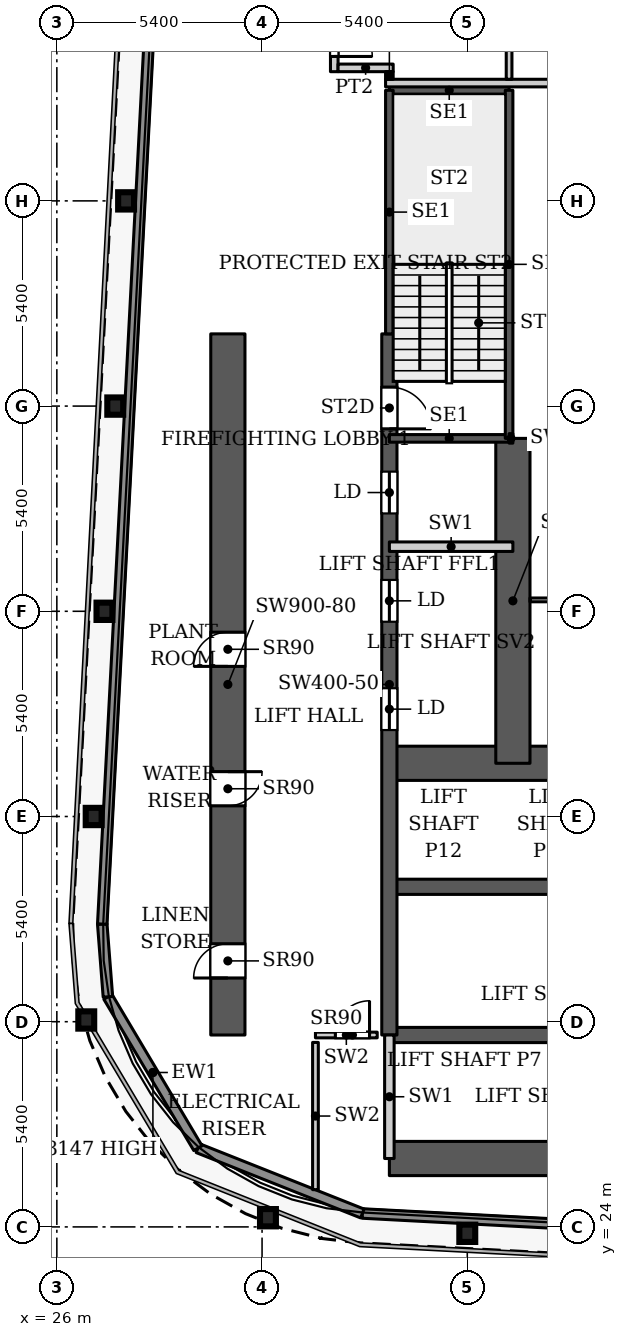
"""IFC4 building model, lengths in metres.
Left out: names, types, materials, properties, quantities, classifications, styles, units other than length and angle.
Written with IfcOpenShell. Run it as: python <this file> out.ifc"""

import sys

from ifc_helpers import new_model, si_unit, direction, frame, frame_2d, origin, origin_2d, place, context, subcontext, project, spatial, rectangle, i_section, extrude, source, transform, mapped, element, fill, save


model = new_model("IFC4")
c1 = context("Model", 3, precision=1e-05, world=origin(), true_north=direction((0.0, 1.0)))
c2 = subcontext(c1, "Body", "Model", "MODEL_VIEW")
j1 = project(units=[si_unit("LENGTHUNIT", "METRE"), si_unit("PLANEANGLEUNIT", "RADIAN")], contexts=[c1])
p1 = place(None, origin())
s1 = spatial("IfcSite", under=j1, at=p1, CompositionType="ELEMENT")
p2 = place(p1, origin())
s2 = spatial("IfcBuilding", under=s1, at=p2, CompositionType="ELEMENT")
p3 = place(p2, frame((0.0, 0.0, 101.9)))
s3 = spatial("IfcBuildingStorey", under=s2, at=p3, CompositionType="ELEMENT", Elevation=101.9)
for number, where, z_axis, x_axis in (
    (1, (36.8, 23.832, 0.0), (0.0, 0.0, 1.0), (1.0, 0.0, 0.0)),
    (2, (31.555, 24.242, 0.0), (0.0, 0.0, 1.0), (1.0, 0.0, 0.0)),
    (3, (26.774, 29.445, 0.0), (0.0, 0.0, 1.0), (1.0, 0.0, 0.0)),
    (4, (26.969, 34.8, 0.0), (0.0, 0.0, 1.0), (1.0, 0.0, 0.0)),
    (5, (27.253, 40.2, 0.0), (0.0, 0.0, 1.0), (1.0, 0.0, 0.0)),
    (6, (27.537, 45.6, 0.0), (0.0, 0.0, 1.0), (1.0, 0.0, 0.0)),
    (7, (27.822, 51.0, 0.0), (0.0, 0.0, 1.0), (1.0, 0.0, 0.0)),
):
    element("IfcColumn", number, at=place(p3, frame(where, z_axis=z_axis, x_axis=x_axis)), inside=s3, PredefinedType="COLUMN", context=c2, shape_type="SweptSolid", body=[
        extrude(i_section(OverallWidth=0.418, OverallDepth=0.455, WebThickness=0.042, FlangeThickness=0.068, FilletRadius=0.014, at=origin_2d()), origin(), (0.0, 0.0, 1.0), 3.9),
    ])
p4 = place(p3, frame((34.75, 25.8, 0.0), z_axis=(0.0, 0.0, 1.0), x_axis=(1.0, 0.0, 0.0)))
e8 = element("IfcWall", 8, at=p4, inside=s3, PredefinedType="SHEAR", context=c2, shape_type="SweptSolid", body=[
    extrude(rectangle(XDim=18.4, YDim=0.9, at=frame_2d((9.2, 0.0))), origin(), (0.0, 0.0, 1.0), 3.9),
])
p5 = place(p3, frame((34.75, 29.05, 0.0), z_axis=(0.0, 0.0, 1.0), x_axis=(1.0, 0.0, 0.0)))
e9 = element("IfcWall", 9, at=p5, inside=s3, PredefinedType="SHEAR", context=c2, shape_type="SweptSolid", body=[
    extrude(rectangle(XDim=18.4, YDim=0.4, at=frame_2d((9.2, 0.0))), origin(), (0.0, 0.0, 1.0), 3.9),
])
p6 = place(p5, frame((15.125, 0.0, 0.0)))
e10 = element("IfcOpeningElement", 10, at=p6, cuts=e9, PredefinedType="OPENING", context=c2, shape_type="SweptSolid", body=[
    extrude(rectangle(XDim=1.1, YDim=2.2, at=frame_2d((0.55, 1.1))), frame((0.0, 0.21, 0.0), z_axis=(0.0, -1.0, 0.0), x_axis=(1.0, 0.0, 0.0)), (0.0, 0.0, 1.0), 0.42),
])
p7 = place(p3, frame((34.75, 32.95, 0.0), z_axis=(0.0, 0.0, 1.0), x_axis=(1.0, 0.0, 0.0)))
e11 = element("IfcWall", 11, at=p7, inside=s3, PredefinedType="SHEAR", context=c2, shape_type="SweptSolid", body=[
    extrude(rectangle(XDim=14.25, YDim=0.4, at=frame_2d((7.125, 0.0))), origin(), (0.0, 0.0, 1.0), 3.9),
])
p8 = place(p3, frame((34.75, 36.2, 0.0), z_axis=(0.0, 0.0, 1.0), x_axis=(1.0, 0.0, 0.0)))
e12 = element("IfcWall", 12, at=p8, inside=s3, PredefinedType="SHEAR", context=c2, shape_type="SweptSolid", body=[
    extrude(rectangle(XDim=18.4, YDim=0.9, at=frame_2d((9.2, 0.0))), origin(), (0.0, 0.0, 1.0), 3.9),
])
p9 = place(p8, frame((16.9, 0.0, 0.0)))
e13 = element("IfcOpeningElement", 13, at=p9, cuts=e12, PredefinedType="OPENING", context=c2, shape_type="SweptSolid", body=[
    extrude(rectangle(XDim=1.0, YDim=2.2, at=frame_2d((0.5, 1.1))), frame((0.0, 0.46, 0.0), z_axis=(0.0, -1.0, 0.0), x_axis=(1.0, 0.0, 0.0)), (0.0, 0.0, 1.0), 0.92),
])
p10 = place(p3, frame((34.75, 29.05, 0.0), z_axis=(0.0, 0.0, 1.0), x_axis=(0.0, 1.0, 0.0)))
e14 = element("IfcWall", 14, at=p10, inside=s3, PredefinedType="SHEAR", context=c2, shape_type="SweptSolid", body=[
    extrude(rectangle(XDim=18.45, YDim=0.4, at=frame_2d((9.225, 0.0))), origin(), (0.0, 0.0, 1.0), 3.9),
])
p11 = place(p10, frame((8.025, 0.0, 0.0)))
e15 = element("IfcOpeningElement", 15, at=p11, cuts=e14, PredefinedType="OPENING", context=c2, shape_type="SweptSolid", body=[
    extrude(rectangle(XDim=1.1, YDim=2.2, at=frame_2d((0.55, 1.1))), frame((0.0, 0.21, 0.0), z_axis=(0.0, -1.0, 0.0), x_axis=(1.0, 0.0, 0.0)), (0.0, 0.0, 1.0), 0.42),
])
p12 = place(p10, frame((10.875, 0.0, 0.0)))
e16 = element("IfcOpeningElement", 16, at=p12, cuts=e14, PredefinedType="OPENING", context=c2, shape_type="SweptSolid", body=[
    extrude(rectangle(XDim=1.1, YDim=2.2, at=frame_2d((0.55, 1.1))), frame((0.0, 0.21, 0.0), z_axis=(0.0, -1.0, 0.0), x_axis=(1.0, 0.0, 0.0)), (0.0, 0.0, 1.0), 0.42),
])
p13 = place(p10, frame((13.725, 0.0, 0.0)))
e17 = element("IfcOpeningElement", 17, at=p13, cuts=e14, PredefinedType="OPENING", context=c2, shape_type="SweptSolid", body=[
    extrude(rectangle(XDim=1.1, YDim=2.2, at=frame_2d((0.55, 1.1))), frame((0.0, 0.21, 0.0), z_axis=(0.0, -1.0, 0.0), x_axis=(1.0, 0.0, 0.0)), (0.0, 0.0, 1.0), 0.42),
])
p14 = place(p10, frame((15.95, 0.0, 0.0)))
e18 = element("IfcOpeningElement", 18, at=p14, cuts=e14, PredefinedType="OPENING", context=c2, shape_type="SweptSolid", body=[
    extrude(rectangle(XDim=1.1, YDim=2.2, at=frame_2d((0.55, 1.1))), frame((0.0, 0.21, 0.0), z_axis=(0.0, -1.0, 0.0), x_axis=(1.0, 0.0, 0.0)), (0.0, 0.0, 1.0), 0.42),
])
p15 = place(p3, frame((38.0, 36.2, 0.0), z_axis=(0.0, 0.0, 1.0), x_axis=(0.0, 1.0, 0.0)))
e19 = element("IfcWall", 19, at=p15, inside=s3, PredefinedType="SHEAR", context=c2, shape_type="SweptSolid", body=[
    extrude(rectangle(XDim=8.55, YDim=0.9, at=frame_2d((4.275, 0.0))), origin(), (0.0, 0.0, 1.0), 3.9),
])
p16 = place(p3, frame((30.5, 29.05, 0.0), z_axis=(0.0, 0.0, 1.0), x_axis=(0.0, 1.0, 0.0)))
e20 = element("IfcWall", 20, at=p16, inside=s3, PredefinedType="SHEAR", context=c2, shape_type="SweptSolid", body=[
    extrude(rectangle(XDim=18.45, YDim=0.9, at=frame_2d((9.225, 0.0))), origin(), (0.0, 0.0, 1.0), 3.9),
])
p17 = place(p16, frame((1.5, 0.0, 0.0)))
e21 = element("IfcOpeningElement", 21, at=p17, cuts=e20, PredefinedType="OPENING", context=c2, shape_type="SweptSolid", body=[
    extrude(rectangle(XDim=0.9, YDim=2.2, at=frame_2d((0.45, 1.1))), frame((0.0, 0.46, 0.0), z_axis=(0.0, -1.0, 0.0), x_axis=(1.0, 0.0, 0.0)), (0.0, 0.0, 1.0), 0.92),
])
p18 = place(p16, frame((6.03, 0.0, 0.0)))
e22 = element("IfcOpeningElement", 22, at=p18, cuts=e20, PredefinedType="OPENING", context=c2, shape_type="SweptSolid", body=[
    extrude(rectangle(XDim=0.9, YDim=2.2, at=frame_2d((0.45, 1.1))), frame((0.0, 0.46, 0.0), z_axis=(0.0, -1.0, 0.0), x_axis=(1.0, 0.0, 0.0)), (0.0, 0.0, 1.0), 0.92),
])
p19 = place(p16, frame((9.7, 0.0, 0.0)))
e23 = element("IfcOpeningElement", 23, at=p19, cuts=e20, PredefinedType="OPENING", context=c2, shape_type="SweptSolid", body=[
    extrude(rectangle(XDim=0.9, YDim=2.2, at=frame_2d((0.45, 1.1))), frame((0.0, 0.46, 0.0), z_axis=(0.0, -1.0, 0.0), x_axis=(1.0, 0.0, 0.0)), (0.0, 0.0, 1.0), 0.92),
])
p20 = place(p3, frame((100.586, 20.85, 0.0), z_axis=(0.0, 0.0, 1.0), x_axis=(-0.99861746497, 0.052565755559, 0.0)))
e24 = element("IfcWall", 24, at=p20, inside=s3, PredefinedType="SOLIDWALL", context=c2, shape_type="SweptSolid", body=[
    extrude(rectangle(XDim=66.639, YDim=0.25, at=frame_2d((33.319, 0.0))), origin(), (0.0, 0.0, 1.0), 3.75),
])
p21 = place(p3, frame((34.039, 24.353, 0.0), z_axis=(0.0, 0.0, 1.0), x_axis=(-0.929352825399, 0.369192803184, 0.0)))
e25 = element("IfcWall", 25, at=p21, inside=s3, PredefinedType="SOLIDWALL", context=c2, shape_type="SweptSolid", body=[
    extrude(rectangle(XDim=4.656, YDim=0.25, at=frame_2d((2.328, 0.0))), origin(), (0.0, 0.0, 1.0), 3.75),
])
p22 = place(p3, frame((29.712, 26.072, 0.0), z_axis=(0.0, 0.0, 1.0), x_axis=(-0.511028049012, 0.859564036662, 0.0)))
e26 = element("IfcWall", 26, at=p22, inside=s3, PredefinedType="SOLIDWALL", context=c2, shape_type="SweptSolid", body=[
    extrude(rectangle(XDim=4.634, YDim=0.25, at=frame_2d((2.317, 0.0))), origin(), (0.0, 0.0, 1.0), 3.147),
])
p23 = place(p3, frame((27.344, 30.055, 0.0), z_axis=(0.0, 0.0, 1.0), x_axis=(-0.077571675317, 0.99698677784, 0.0)))
e27 = element("IfcWall", 27, at=p23, inside=s3, PredefinedType="SOLIDWALL", context=c2, shape_type="SweptSolid", body=[
    extrude(rectangle(XDim=1.92, YDim=0.25, at=frame_2d((0.96, 0.0))), origin(), (0.0, 0.0, 1.0), 3.75),
])
p24 = place(p3, frame((27.195, 31.969, 0.0), z_axis=(0.0, 0.0, 1.0), x_axis=(0.052559748861, 0.998617781135, 0.0)))
e28 = element("IfcWall", 28, at=p24, inside=s3, PredefinedType="SOLIDWALL", context=c2, shape_type="SweptSolid", body=[
    extrude(rectangle(XDim=55.972, YDim=0.25, at=frame_2d((27.986, 0.0))), origin(), (0.0, 0.0, 1.0), 3.75),
])
for number, where, z_axis, x_axis in (
    (29, (34.75, 44.75, 0.0), (0.0, 0.0, 1.0), (1.0, 0.0, 0.0)),
    (30, (34.75, 53.91, 0.0), (0.0, 0.0, 1.0), (1.0, 0.0, 0.0)),
):
    element("IfcWall", number, at=place(p3, frame(where, z_axis=z_axis, x_axis=x_axis)), inside=s3, PredefinedType="SHEAR", context=c2, shape_type="SweptSolid", body=[
        extrude(rectangle(XDim=3.15, YDim=0.2, at=frame_2d((1.575, 0.0))), origin(), (0.0, 0.0, 1.0), 3.9),
    ])
p25 = place(p3, frame((34.75, 47.5, 0.0), z_axis=(0.0, 0.0, 1.0), x_axis=(0.0, 1.0, 0.0)))
e31 = element("IfcWall", 31, at=p25, inside=s3, PredefinedType="SHEAR", context=c2, shape_type="SweptSolid", body=[
    extrude(rectangle(XDim=6.41, YDim=0.2, at=frame_2d((3.205, 0.0))), origin(), (0.0, 0.0, 1.0), 3.9),
])
p26 = place(p3, frame((37.9, 44.75, 0.0), z_axis=(0.0, 0.0, 1.0), x_axis=(0.0, 1.0, 0.0)))
e32 = element("IfcWall", 32, at=p26, inside=s3, PredefinedType="SHEAR", context=c2, shape_type="SweptSolid", body=[
    extrude(rectangle(XDim=9.16, YDim=0.2, at=frame_2d((4.58, 0.0))), origin(), (0.0, 0.0, 1.0), 3.9),
])
for number, where, z_axis, x_axis in (
    (33, (34.75, 25.8, 0.0), (0.0, 0.0, 1.0), (0.0, 1.0, 0.0)),
    (34, (34.75, 41.9, 0.0), (0.0, 0.0, 1.0), (1.0, 0.0, 0.0)),
):
    element("IfcWall", number, at=place(p3, frame(where, z_axis=z_axis, x_axis=x_axis)), inside=s3, PredefinedType="PARTITIONING", context=c2, shape_type="SweptSolid", body=[
        extrude(rectangle(XDim=3.25, YDim=0.25, at=frame_2d((1.625, 0.0))), origin(), (0.0, 0.0, 1.0), 3.9),
    ])
p27 = place(p3, frame((37.9, 44.75, 0.0), z_axis=(0.0, 0.0, 1.0), x_axis=(1.0, 0.0, 0.0)))
e35 = element("IfcWall", 35, at=p27, inside=s3, PredefinedType="PARTITIONING", context=c2, shape_type="SweptSolid", body=[
    extrude(rectangle(XDim=0.1, YDim=0.25, at=frame_2d((0.05, 0.0))), origin(), (0.0, 0.0, 1.0), 3.9),
])
p28 = place(p3, frame((32.805, 29.05, 0.0), z_axis=(0.0, 0.0, 1.0), x_axis=(1.0, 0.0, 0.0)))
e36 = element("IfcWall", 36, at=p28, inside=s3, PredefinedType="PARTITIONING", context=c2, shape_type="SweptSolid", body=[
    extrude(rectangle(XDim=1.625, YDim=0.15, at=frame_2d((0.812, 0.0))), origin(), (0.0, 0.0, 1.0), 3.9),
])
p29 = place(p28, frame((0.523, 0.0, 0.0)))
e37 = element("IfcOpeningElement", 37, at=p29, cuts=e36, PredefinedType="OPENING", context=c2, shape_type="SweptSolid", body=[
    extrude(rectangle(XDim=0.9, YDim=2.2, at=frame_2d((0.45, 1.1))), frame((0.0, 0.085, 0.0), z_axis=(0.0, -1.0, 0.0), x_axis=(1.0, 0.0, 0.0)), (0.0, 0.0, 1.0), 0.17),
])
p30 = place(p3, frame((32.805, 24.98, 0.0), z_axis=(0.0, 0.0, 1.0), x_axis=(0.0, 1.0, 0.0)))
e38 = element("IfcWall", 38, at=p30, inside=s3, PredefinedType="PARTITIONING", context=c2, shape_type="SweptSolid", body=[
    extrude(rectangle(XDim=3.875, YDim=0.15, at=frame_2d((1.938, 0.0))), origin(), (0.0, 0.0, 1.0), 3.9),
])
p31 = place(p3, frame((33.3, 54.4, 0.0), z_axis=(0.0, 0.0, 1.0), x_axis=(0.0, 1.0, 0.0)))
e39 = element("IfcWall", 39, at=p31, inside=s3, PredefinedType="PARTITIONING", context=c2, shape_type="SweptSolid", body=[
    extrude(rectangle(XDim=24.95, YDim=0.2, at=frame_2d((12.475, 0.0))), origin(), (0.0, 0.0, 1.0), 3.6),
])
p32 = place(p31, frame((0.4, 0.0, 0.0)))
e40 = element("IfcOpeningElement", 40, at=p32, cuts=e39, PredefinedType="OPENING", context=c2, shape_type="SweptSolid", body=[
    extrude(rectangle(XDim=1.0, YDim=2.1, at=frame_2d((0.5, 1.05))), frame((0.0, 0.11, 0.0), z_axis=(0.0, -1.0, 0.0), x_axis=(1.0, 0.0, 0.0)), (0.0, 0.0, 1.0), 0.22),
])
p33 = place(p31, frame((13.75, 0.0, 0.0)))
e41 = element("IfcOpeningElement", 41, at=p33, cuts=e39, PredefinedType="OPENING", context=c2, shape_type="SweptSolid", body=[
    extrude(rectangle(XDim=1.0, YDim=2.1, at=frame_2d((0.5, 1.05))), frame((0.0, 0.11, 0.0), z_axis=(0.0, -1.0, 0.0), x_axis=(1.0, 0.0, 0.0)), (0.0, 0.0, 1.0), 0.22),
])
p34 = place(p3, frame((33.4, 54.5, 0.0), z_axis=(0.0, 0.0, 1.0), x_axis=(1.0, 0.0, 0.0)))
e42 = element("IfcWall", 42, at=p34, inside=s3, PredefinedType="PARTITIONING", context=c2, shape_type="SweptSolid", body=[
    extrude(rectangle(XDim=1.45, YDim=0.2, at=frame_2d((0.725, 0.0))), origin(), (0.0, 0.0, 1.0), 3.6),
])
p35 = place(p3, frame((34.65, 54.1, 0.0), z_axis=(0.0, 0.0, 1.0), x_axis=(1.0, 0.0, 0.0)))
e43 = element("IfcWall", 43, at=p35, inside=s3, PredefinedType="PARTITIONING", context=c2, shape_type="SweptSolid", body=[
    extrude(rectangle(XDim=11.25, YDim=0.2, at=frame_2d((5.625, 0.0))), origin(), (0.0, 0.0, 1.0), 3.6),
])
p36 = place(p3, frame((34.75, 54.2, 0.0), z_axis=(0.0, 0.0, 1.0), x_axis=(0.0, 1.0, 0.0)))
e44 = element("IfcWall", 44, at=p36, inside=s3, PredefinedType="PARTITIONING", context=c2, shape_type="SweptSolid", body=[
    extrude(rectangle(XDim=0.2, YDim=0.2, at=frame_2d((0.1, 0.0))), origin(), (0.0, 0.0, 1.0), 3.6),
])
p37 = place(p3, frame((37.9, 54.2, 0.0), z_axis=(0.0, 0.0, 1.0), x_axis=(0.0, 1.0, 0.0)))
e45 = element("IfcWall", 45, at=p37, inside=s3, PredefinedType="PARTITIONING", context=c2, shape_type="SweptSolid", body=[
    extrude(rectangle(XDim=13.3, YDim=0.15, at=frame_2d((6.65, 0.0))), origin(), (0.0, 0.0, 1.0), 3.6),
])
p38 = place(p37, frame((6.2, 0.0, 0.0)))
e46 = element("IfcOpeningElement", 46, at=p38, cuts=e45, PredefinedType="OPENING", context=c2, shape_type="SweptSolid", body=[
    extrude(rectangle(XDim=0.9, YDim=2.1, at=frame_2d((0.45, 1.05))), frame((0.0, 0.085, 0.0), z_axis=(0.0, -1.0, 0.0), x_axis=(1.0, 0.0, 0.0)), (0.0, 0.0, 1.0), 0.17),
])
p39 = place(p37, frame((1.95, 0.0, 0.0)))
e47 = element("IfcOpeningElement", 47, at=p39, cuts=e45, PredefinedType="OPENING", context=c2, shape_type="SweptSolid", body=[
    extrude(rectangle(XDim=1.0, YDim=2.1, at=frame_2d((0.5, 1.05))), frame((0.0, 0.085, 0.0), z_axis=(0.0, -1.0, 0.0), x_axis=(1.0, 0.0, 0.0)), (0.0, 0.0, 1.0), 0.17),
])
p40 = place(p37, frame((9.35, 0.0, 0.0)))
e48 = element("IfcOpeningElement", 48, at=p40, cuts=e45, PredefinedType="OPENING", context=c2, shape_type="SweptSolid", body=[
    extrude(rectangle(XDim=0.9, YDim=2.1, at=frame_2d((0.45, 1.05))), frame((0.0, 0.085, 0.0), z_axis=(0.0, -1.0, 0.0), x_axis=(1.0, 0.0, 0.0)), (0.0, 0.0, 1.0), 0.17),
])
p41 = place(p3, frame((38.449, 40.5, 0.0), z_axis=(0.0, 0.0, 1.0), x_axis=(1.0, 0.0, 0.0)))
e49 = element("IfcWall", 49, at=p41, inside=s3, PredefinedType="PARTITIONING", context=c2, shape_type="SweptSolid", body=[
    extrude(rectangle(XDim=14.851, YDim=0.1, at=frame_2d((7.426, 0.0))), origin(), (0.0, 0.0, 1.0), 3.6),
])
p42 = place(p41, frame((6.751, 0.0, 0.0)))
e50 = element("IfcOpeningElement", 50, at=p42, cuts=e49, PredefinedType="OPENING", context=c2, shape_type="SweptSolid", body=[
    extrude(rectangle(XDim=1.0, YDim=2.1, at=frame_2d((0.5, 1.05))), frame((0.0, 0.06, 0.0), z_axis=(0.0, -1.0, 0.0), x_axis=(1.0, 0.0, 0.0)), (0.0, 0.0, 1.0), 0.12),
])
m1 = source(origin(), c2, "Body", "SweptSolid", [
    extrude(rectangle(XDim=1.1, YDim=2.2, at=frame_2d((0.55, 1.1))), frame((0.0, 0.025, 0.0), z_axis=(0.0, -1.0, 0.0), x_axis=(1.0, 0.0, 0.0)), (0.0, 0.0, 1.0), 0.05),
])
p43 = place(p11, origin())
e51 = element("IfcDoor", 51, at=p43, inside=s3, OperationType="SLIDING_TO_LEFT", PredefinedType="DOOR", context=c2, shape_type="MappedRepresentation", body=[
    mapped(m1, transform((0.0, 0.0, 0.0), x_axis=(1.0, 0.0, 0.0), y_axis=(0.0, 1.0, 0.0), z_axis=(0.0, 0.0, 1.0), scale=1.0)),
])
fill(e15, e51)
p44 = place(p12, origin())
e52 = element("IfcDoor", 52, at=p44, inside=s3, OperationType="SLIDING_TO_LEFT", PredefinedType="DOOR", context=c2, shape_type="MappedRepresentation", body=[
    mapped(m1, transform((0.0, 0.0, 0.0), x_axis=(1.0, 0.0, 0.0), y_axis=(0.0, 1.0, 0.0), z_axis=(0.0, 0.0, 1.0), scale=1.0)),
])
fill(e16, e52)
p45 = place(p13, origin())
e53 = element("IfcDoor", 53, at=p45, inside=s3, OperationType="SLIDING_TO_LEFT", PredefinedType="DOOR", context=c2, shape_type="MappedRepresentation", body=[
    mapped(m1, transform((0.0, 0.0, 0.0), x_axis=(1.0, 0.0, 0.0), y_axis=(0.0, 1.0, 0.0), z_axis=(0.0, 0.0, 1.0), scale=1.0)),
])
fill(e17, e53)
m2 = source(origin(), c2, "Body", "SweptSolid", [
    extrude(rectangle(XDim=0.9, YDim=2.2, at=frame_2d((0.45, 1.1))), frame((0.0, 0.025, 0.0), z_axis=(0.0, -1.0, 0.0), x_axis=(1.0, 0.0, 0.0)), (0.0, 0.0, 1.0), 0.05),
])
p46 = place(p17, origin())
e54 = element("IfcDoor", 54, at=p46, inside=s3, OperationType="SINGLE_SWING_LEFT", PredefinedType="DOOR", context=c2, shape_type="MappedRepresentation", body=[
    mapped(m2, transform((0.0, 0.0, 0.0), x_axis=(1.0, 0.0, 0.0), y_axis=(0.0, 1.0, 0.0), z_axis=(0.0, 0.0, 1.0), scale=1.0)),
])
fill(e21, e54)
p47 = place(p18, origin())
e55 = element("IfcDoor", 55, at=p47, inside=s3, OperationType="SINGLE_SWING_RIGHT", PredefinedType="DOOR", context=c2, shape_type="MappedRepresentation", body=[
    mapped(m2, transform((0.0, 0.0, 0.0), x_axis=(1.0, 0.0, 0.0), y_axis=(0.0, 1.0, 0.0), z_axis=(0.0, 0.0, 1.0), scale=1.0)),
])
fill(e22, e55)
p48 = place(p19, origin())
e56 = element("IfcDoor", 56, at=p48, inside=s3, OperationType="SINGLE_SWING_LEFT", PredefinedType="DOOR", context=c2, shape_type="MappedRepresentation", body=[
    mapped(m2, transform((0.0, 0.0, 0.0), x_axis=(1.0, 0.0, 0.0), y_axis=(0.0, 1.0, 0.0), z_axis=(0.0, 0.0, 1.0), scale=1.0)),
])
fill(e23, e56)
p49 = place(p29, origin())
e57 = element("IfcDoor", 57, at=p49, inside=s3, OperationType="SINGLE_SWING_LEFT", PredefinedType="DOOR", context=c2, shape_type="MappedRepresentation", body=[
    mapped(m2, transform((0.0, 0.0, 0.0), x_axis=(1.0, 0.0, 0.0), y_axis=(0.0, 1.0, 0.0), z_axis=(0.0, 0.0, 1.0), scale=1.0)),
])
fill(e37, e57)
m3 = source(origin(), c2, "Body", "SweptSolid", [
    extrude(rectangle(XDim=1.1, YDim=2.2, at=frame_2d((0.55, 1.1))), frame((0.0, 0.025, 0.0), z_axis=(0.0, -1.0, 0.0), x_axis=(1.0, 0.0, 0.0)), (0.0, 0.0, 1.0), 0.05),
])
p50 = place(p14, origin())
e58 = element("IfcDoor", 58, at=p50, inside=s3, OperationType="SINGLE_SWING_RIGHT", PredefinedType="DOOR", context=c2, shape_type="MappedRepresentation", body=[
    mapped(m3, transform((0.0, 0.0, 0.0), x_axis=(1.0, 0.0, 0.0), y_axis=(0.0, 1.0, 0.0), z_axis=(0.0, 0.0, 1.0), scale=1.0)),
])
fill(e18, e58)
m4 = source(origin(), c2, "Body", "SweptSolid", [
    extrude(rectangle(XDim=1.0, YDim=2.1, at=frame_2d((0.5, 1.05))), frame((0.0, 0.025, 0.0), z_axis=(0.0, -1.0, 0.0), x_axis=(1.0, 0.0, 0.0)), (0.0, 0.0, 1.0), 0.05),
])
p51 = place(p32, origin())
e59 = element("IfcDoor", 59, at=p51, inside=s3, OperationType="SINGLE_SWING_RIGHT", PredefinedType="DOOR", context=c2, shape_type="MappedRepresentation", body=[
    mapped(m4, transform((0.0, 0.0, 0.0), x_axis=(1.0, 0.0, 0.0), y_axis=(0.0, 1.0, 0.0), z_axis=(0.0, 0.0, 1.0), scale=1.0)),
])
fill(e40, e59)
save(model, sys.argv[1])
